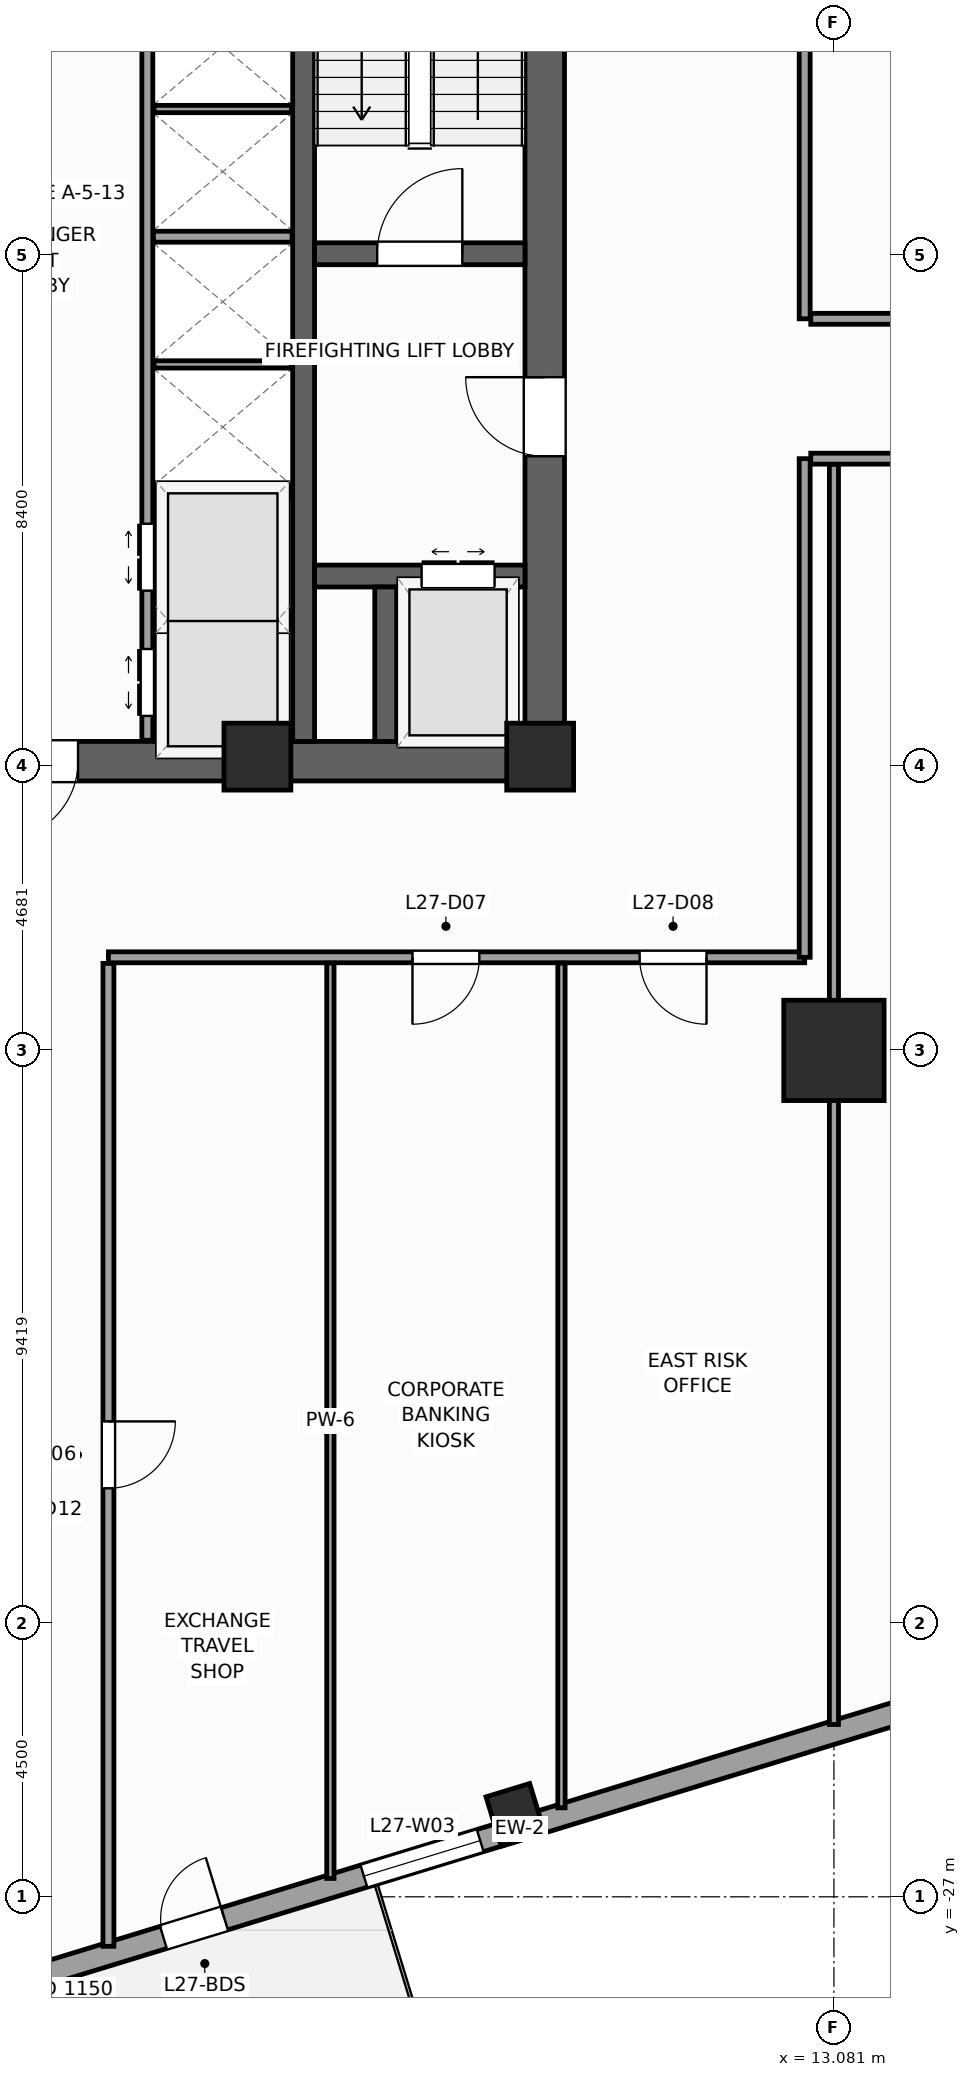
"""IFC4 building model, lengths in metres.
Left out: names, types, materials, properties, quantities, classifications, styles, units other than length and angle.
Written with IfcOpenShell. Run it as: python <this file> out.ifc"""

import sys

from ifc_helpers import new_model, si_unit, direction, frame, frame_2d, origin, origin_2d, place, context, subcontext, project, spatial, rectangle, extrude, source, transform, mapped, element, fill, save


model = new_model("IFC4")
c1 = context("Model", 3, precision=1e-05, world=origin(), true_north=direction((0.0, 1.0)))
c2 = subcontext(c1, "Body", "Model", "MODEL_VIEW")
j1 = project(units=[si_unit("LENGTHUNIT", "METRE"), si_unit("PLANEANGLEUNIT", "RADIAN")], contexts=[c1])
p1 = place(None, origin())
s1 = spatial("IfcSite", under=j1, at=p1, CompositionType="ELEMENT")
p2 = place(p1, origin())
s2 = spatial("IfcBuilding", under=s1, at=p2, CompositionType="ELEMENT")
p3 = place(p2, frame((0.0, 0.0, 115.2)))
s3 = spatial("IfcBuildingStorey", under=s2, at=p3, CompositionType="ELEMENT", Elevation=115.2)
p4 = place(p3, frame((-8.65, -8.325, 0.0), z_axis=(0.0, 0.0, 1.0), x_axis=(1.0, 0.0, 0.0)))
e1 = element("IfcWall", 1, at=p4, inside=s3, PredefinedType="SHEAR", context=c2, shape_type="SweptSolid", body=[
    extrude(rectangle(XDim=17.3, YDim=0.65, at=frame_2d((8.65, 0.0))), origin(), (0.0, 0.0, 1.0), 4.0),
])
p5 = place(p4, frame((8.0, 0.0, 0.0)))
e2 = element("IfcOpeningElement", 2, at=p5, cuts=e1, PredefinedType="OPENING", context=c2, shape_type="SweptSolid", body=[
    extrude(rectangle(XDim=1.3, YDim=2.2, at=frame_2d((0.65, 1.1))), frame((0.0, 0.335, 0.0), z_axis=(0.0, -1.0, 0.0), x_axis=(1.0, 0.0, 0.0)), (0.0, 0.0, 1.0), 0.67),
])
p6 = place(p3, frame((8.325, -8.0, 0.0), z_axis=(0.0, 0.0, 1.0), x_axis=(0.0, 1.0, 0.0)))
e3 = element("IfcWall", 3, at=p6, inside=s3, PredefinedType="SHEAR", context=c2, shape_type="SweptSolid", body=[
    extrude(rectangle(XDim=16.0, YDim=0.65, at=frame_2d((8.0, 0.0))), origin(), (0.0, 0.0, 1.0), 4.0),
])
p7 = place(p6, frame((4.69, 0.0, 0.0)))
e4 = element("IfcOpeningElement", 4, at=p7, cuts=e3, PredefinedType="OPENING", context=c2, shape_type="SweptSolid", body=[
    extrude(rectangle(XDim=1.3, YDim=2.2, at=frame_2d((0.65, 1.1))), frame((0.0, 0.335, 0.0), z_axis=(0.0, -1.0, 0.0), x_axis=(1.0, 0.0, 0.0)), (0.0, 0.0, 1.0), 0.67),
])
p8 = place(p3, frame((4.36, -8.0, 0.0), z_axis=(0.0, 0.0, 1.0), x_axis=(0.0, 1.0, 0.0)))
e5 = element("IfcWall", 5, at=p8, inside=s3, PredefinedType="SHEAR", context=c2, shape_type="SweptSolid", body=[
    extrude(rectangle(XDim=16.0, YDim=0.36, at=frame_2d((8.0, 0.0))), origin(), (0.0, 0.0, 1.0), 4.0),
])
p9 = place(p3, frame((4.54, 0.02, 0.0), z_axis=(0.0, 0.0, 1.0), x_axis=(1.0, 0.0, 0.0)))
e6 = element("IfcWall", 6, at=p9, inside=s3, PredefinedType="SHEAR", context=c2, shape_type="SweptSolid", body=[
    extrude(rectangle(XDim=3.46, YDim=0.36, at=frame_2d((1.73, 0.0))), origin(), (0.0, 0.0, 1.0), 4.0),
])
p10 = place(p9, frame((1.03, 0.0, 0.0)))
e7 = element("IfcOpeningElement", 7, at=p10, cuts=e6, PredefinedType="OPENING", context=c2, shape_type="SweptSolid", body=[
    extrude(rectangle(XDim=1.4, YDim=2.2, at=frame_2d((0.7, 1.1))), frame((0.0, 0.19, 0.0), z_axis=(0.0, -1.0, 0.0), x_axis=(1.0, 0.0, 0.0)), (0.0, 0.0, 1.0), 0.38),
])
p11 = place(p3, frame((4.54, -5.28, 0.0), z_axis=(0.0, 0.0, 1.0), x_axis=(1.0, 0.0, 0.0)))
e8 = element("IfcWall", 8, at=p11, inside=s3, PredefinedType="SHEAR", context=c2, shape_type="SweptSolid", body=[
    extrude(rectangle(XDim=3.46, YDim=0.36, at=frame_2d((1.73, 0.0))), origin(), (0.0, 0.0, 1.0), 4.0),
])
p12 = place(p11, frame((1.76, 0.0, 0.0)))
e9 = element("IfcOpeningElement", 9, at=p12, cuts=e8, PredefinedType="OPENING", context=c2, shape_type="SweptSolid", body=[
    extrude(rectangle(XDim=1.2, YDim=2.25, at=frame_2d((0.6, 1.125))), frame((0.0, 0.19, 0.0), z_axis=(0.0, -1.0, 0.0), x_axis=(1.0, 0.0, 0.0)), (0.0, 0.0, 1.0), 0.38),
])
p13 = place(p3, frame((5.71, -8.0, 0.0), z_axis=(0.0, 0.0, 1.0), x_axis=(0.0, 1.0, 0.0)))
e10 = element("IfcWall", 10, at=p13, inside=s3, PredefinedType="SHEAR", context=c2, shape_type="SweptSolid", body=[
    extrude(rectangle(XDim=2.54, YDim=0.36, at=frame_2d((1.27, 0.0))), origin(), (0.0, 0.0, 1.0), 4.0),
])
m1 = source(origin(), c2, "Body", "SweptSolid", [
    extrude(rectangle(XDim=1.1, YDim=1.1, at=origin_2d()), origin(), (0.0, 0.0, 1.0), 4.0),
])
for number, where, z_axis, x_axis in (
    (11, (8.25, -8.25, 0.0), (0.0, 0.0, 1.0), (1.0, 0.0, 0.0)),
    (12, (3.6, -8.25, 0.0), (0.0, 0.0, 1.0), (1.0, 0.0, 0.0)),
):
    element("IfcColumn", number, at=place(p3, frame(where, z_axis=z_axis, x_axis=x_axis)), inside=s3, PredefinedType="PILASTER", context=c2, shape_type="MappedRepresentation", body=[
        mapped(m1, transform((0.0, 0.0, 0.0), scale=1.0)),
    ])
m2 = source(origin(), c2, "Body", "SweptSolid", [
    extrude(rectangle(XDim=1.65, YDim=1.65, at=origin_2d()), origin(), (0.0, 0.0, 1.0), 4.0),
])
p14 = place(p3, frame((13.081, -13.081, 0.0), z_axis=(0.0, 0.0, 1.0), x_axis=(1.0, 0.0, 0.0)))
e13 = element("IfcColumn", 13, at=p14, inside=s3, PredefinedType="COLUMN", context=c2, shape_type="MappedRepresentation", body=[
    mapped(m2, transform((0.0, 0.0, 0.0), scale=1.0)),
])
m3 = source(origin(), c2, "Body", "SweptSolid", [
    extrude(rectangle(XDim=0.75, YDim=0.85, at=origin_2d()), origin(), (0.0, 0.0, 1.0), 4.0),
])
p15 = place(p3, frame((7.843, -25.653, 0.0), z_axis=(0.0, 0.0, 1.0), x_axis=(0.956304755963, 0.292371704723, 0.0)))
e14 = element("IfcColumn", 14, at=p15, inside=s3, PredefinedType="COLUMN", context=c2, shape_type="MappedRepresentation", body=[
    mapped(m3, transform((0.0, 0.0, 0.0), scale=1.0)),
])
p16 = place(p3, frame((-14.265, -32.658, 0.0), z_axis=(0.0, 0.0, 1.0), x_axis=(0.956304320851, 0.292373127906, 0.0)))
e15 = element("IfcWall", 15, at=p16, inside=s3, PredefinedType="STANDARD", context=c2, shape_type="SweptSolid", body=[
    extrude(rectangle(XDim=46.38, YDim=0.38, at=frame_2d((23.19, 0.0))), origin(), (0.0, 0.0, 1.0), 3.14),
])
p17 = place(p16, frame((17.065, 0.0, 0.0)))
e16 = element("IfcOpeningElement", 16, at=p17, cuts=e15, PredefinedType="OPENING", context=c2, shape_type="SweptSolid", body=[
    extrude(rectangle(XDim=1.05, YDim=2.25, at=frame_2d((0.525, 1.125))), frame((0.0, 0.2, 0.0), z_axis=(0.0, -1.0, 0.0), x_axis=(1.0, 0.0, 0.0)), (0.0, 0.0, 1.0), 0.4),
])
p18 = place(p16, frame((4.865, 0.0, 0.51)))
e17 = element("IfcOpeningElement", 17, at=p18, cuts=e15, PredefinedType="OPENING", context=c2, shape_type="SweptSolid", body=[
    extrude(rectangle(XDim=1.4, YDim=2.4, at=frame_2d((0.7, 1.2))), frame((0.0, 0.2, 0.0), z_axis=(0.0, -1.0, 0.0), x_axis=(1.0, 0.0, 0.0)), (0.0, 0.0, 1.0), 0.4),
])
p19 = place(p16, frame((10.95, 0.0, 0.51)))
e18 = element("IfcOpeningElement", 18, at=p19, cuts=e15, PredefinedType="OPENING", context=c2, shape_type="SweptSolid", body=[
    extrude(rectangle(XDim=2.0, YDim=2.4, at=frame_2d((1.0, 1.2))), frame((0.0, 0.2, 0.0), z_axis=(0.0, -1.0, 0.0), x_axis=(1.0, 0.0, 0.0)), (0.0, 0.0, 1.0), 0.4),
])
p20 = place(p16, frame((20.512, 0.0, 0.51)))
e19 = element("IfcOpeningElement", 19, at=p20, cuts=e15, PredefinedType="OPENING", context=c2, shape_type="SweptSolid", body=[
    extrude(rectangle(XDim=2.0, YDim=2.4, at=frame_2d((1.0, 1.2))), frame((0.0, 0.2, 0.0), z_axis=(0.0, -1.0, 0.0), x_axis=(1.0, 0.0, 0.0)), (0.0, 0.0, 1.0), 0.4),
])
p21 = place(p16, frame((30.538, 0.0, 0.51)))
e20 = element("IfcOpeningElement", 20, at=p21, cuts=e15, PredefinedType="OPENING", context=c2, shape_type="SweptSolid", body=[
    extrude(rectangle(XDim=2.0, YDim=2.4, at=frame_2d((1.0, 1.2))), frame((0.0, 0.2, 0.0), z_axis=(0.0, -1.0, 0.0), x_axis=(1.0, 0.0, 0.0)), (0.0, 0.0, 1.0), 0.4),
])
p22 = place(p16, frame((39.187, 0.0, 0.51)))
e21 = element("IfcOpeningElement", 21, at=p22, cuts=e15, PredefinedType="OPENING", context=c2, shape_type="SweptSolid", body=[
    extrude(rectangle(XDim=1.4, YDim=2.4, at=frame_2d((0.7, 1.2))), frame((0.0, 0.2, 0.0), z_axis=(0.0, -1.0, 0.0), x_axis=(1.0, 0.0, 0.0)), (0.0, 0.0, 1.0), 0.4),
])
p23 = place(p3, frame((1.79, -7.98, 0.0), z_axis=(0.0, 0.0, 1.0), x_axis=(0.0, 1.0, 0.0)))
e22 = element("IfcWall", 22, at=p23, inside=s3, PredefinedType="PARTITIONING", context=c2, shape_type="SweptSolid", body=[
    extrude(rectangle(XDim=12.38, YDim=0.18, at=frame_2d((6.19, 0.0))), origin(), (0.0, 0.0, 1.0), 3.74),
])
p24 = place(p23, frame((0.4, 0.0, 0.0)))
e23 = element("IfcOpeningElement", 23, at=p24, cuts=e22, PredefinedType="OPENING", context=c2, shape_type="SweptSolid", body=[
    extrude(rectangle(XDim=1.1, YDim=2.2, at=frame_2d((0.55, 1.1))), frame((0.0, 0.1, 0.0), z_axis=(0.0, -1.0, 0.0), x_axis=(1.0, 0.0, 0.0)), (0.0, 0.0, 1.0), 0.2),
])
p25 = place(p23, frame((2.46, 0.0, 0.0)))
e24 = element("IfcOpeningElement", 24, at=p25, cuts=e22, PredefinedType="OPENING", context=c2, shape_type="SweptSolid", body=[
    extrude(rectangle(XDim=1.1, YDim=2.2, at=frame_2d((0.55, 1.1))), frame((0.0, 0.1, 0.0), z_axis=(0.0, -1.0, 0.0), x_axis=(1.0, 0.0, 0.0)), (0.0, 0.0, 1.0), 0.2),
])
for number, where, z_axis, x_axis in (
    (25, (1.89, -3.9, 0.0), (0.0, 0.0, 1.0), (1.0, 0.0, 0.0)),
    (26, (1.89, 0.3, 0.0), (0.0, 0.0, 1.0), (1.0, 0.0, 0.0)),
):
    element("IfcWall", number, at=place(p3, frame(where, z_axis=z_axis, x_axis=x_axis)), inside=s3, PredefinedType="PARTITIONING", context=c2, shape_type="SweptSolid", body=[
        extrude(rectangle(XDim=2.28, YDim=0.18, at=frame_2d((1.14, 0.0))), origin(), (0.0, 0.0, 1.0), 3.74),
    ])
for number, where, z_axis, x_axis in (
    (27, (1.9, -6.0, 0.0), (0.0, 0.0, 1.0), (1.0, 0.0, 0.0)),
    (28, (1.9, -1.8, 0.0), (0.0, 0.0, 1.0), (1.0, 0.0, 0.0)),
    (29, (1.9, 2.4, 0.0), (0.0, 0.0, 1.0), (1.0, 0.0, 0.0)),
):
    element("IfcWall", number, at=place(p3, frame(where, z_axis=z_axis, x_axis=x_axis)), inside=s3, PredefinedType="PARTITIONING", context=c2, shape_type="SweptSolid", body=[
        extrude(rectangle(XDim=2.26, YDim=0.12, at=frame_2d((1.13, 0.0))), origin(), (0.0, 0.0, 1.0), 3.74),
    ])
p26 = place(p3, frame((1.15, -11.55, 0.0), z_axis=(0.0, 0.0, 1.0), x_axis=(1.0, 0.0, 0.0)))
e30 = element("IfcWall", 30, at=p26, inside=s3, PredefinedType="PARTITIONING", context=c2, shape_type="SweptSolid", body=[
    extrude(rectangle(XDim=11.45, YDim=0.18, at=frame_2d((5.725, 0.0))), origin(), (0.0, 0.0, 1.0), 3.74),
])
p27 = place(p26, frame((5.0, 0.0, 0.0)))
e31 = element("IfcOpeningElement", 31, at=p27, cuts=e30, PredefinedType="OPENING", context=c2, shape_type="SweptSolid", body=[
    extrude(rectangle(XDim=1.1, YDim=2.2, at=frame_2d((0.55, 1.1))), frame((0.0, 0.1, 0.0), z_axis=(0.0, -1.0, 0.0), x_axis=(1.0, 0.0, 0.0)), (0.0, 0.0, 1.0), 0.2),
])
p28 = place(p26, frame((8.736, 0.0, 0.0)))
e32 = element("IfcOpeningElement", 32, at=p28, cuts=e30, PredefinedType="OPENING", context=c2, shape_type="SweptSolid", body=[
    extrude(rectangle(XDim=1.1, YDim=2.2, at=frame_2d((0.55, 1.1))), frame((0.0, 0.1, 0.0), z_axis=(0.0, -1.0, 0.0), x_axis=(1.0, 0.0, 0.0)), (0.0, 0.0, 1.0), 0.2),
])
p29 = place(p3, frame((12.6, -11.55, 0.0), z_axis=(0.0, 0.0, 1.0), x_axis=(0.0, 1.0, 0.0)))
e33 = element("IfcWall", 33, at=p29, inside=s3, PredefinedType="PARTITIONING", context=c2, shape_type="SweptSolid", body=[
    extrude(rectangle(XDim=8.2, YDim=0.18, at=frame_2d((4.1, 0.0))), origin(), (0.0, 0.0, 1.0), 3.74),
])
p30 = place(p3, frame((12.6, -1.05, 0.0), z_axis=(0.0, 0.0, 1.0), x_axis=(0.0, 1.0, 0.0)))
e34 = element("IfcWall", 34, at=p30, inside=s3, PredefinedType="PARTITIONING", context=c2, shape_type="SweptSolid", body=[
    extrude(rectangle(XDim=11.5, YDim=0.18, at=frame_2d((5.75, 0.0))), origin(), (0.0, 0.0, 1.0), 3.74),
])
p31 = place(p3, frame((12.7, -3.35, 0.0), z_axis=(0.0, 0.0, 1.0), x_axis=(1.0, 0.0, 0.0)))
e35 = element("IfcWall", 35, at=p31, inside=s3, PredefinedType="PARTITIONING", context=c2, shape_type="SweptSolid", body=[
    extrude(rectangle(XDim=16.49, YDim=0.18, at=frame_2d((8.245, 0.0))), origin(), (0.0, 0.0, 1.0), 3.74),
])
p32 = place(p31, frame((7.721, 0.0, 0.0)))
e36 = element("IfcOpeningElement", 36, at=p32, cuts=e35, PredefinedType="OPENING", context=c2, shape_type="SweptSolid", body=[
    extrude(rectangle(XDim=1.1, YDim=2.2, at=frame_2d((0.55, 1.1))), frame((0.0, 0.1, 0.0), z_axis=(0.0, -1.0, 0.0), x_axis=(1.0, 0.0, 0.0)), (0.0, 0.0, 1.0), 0.2),
])
p33 = place(p3, frame((12.7, -1.05, 0.0), z_axis=(0.0, 0.0, 1.0), x_axis=(1.0, 0.0, 0.0)))
e37 = element("IfcWall", 37, at=p33, inside=s3, PredefinedType="PARTITIONING", context=c2, shape_type="SweptSolid", body=[
    extrude(rectangle(XDim=15.787, YDim=0.18, at=frame_2d((7.894, 0.0))), origin(), (0.0, 0.0, 1.0), 3.74),
])
p34 = place(p33, frame((7.343, 0.0, 0.0)))
e38 = element("IfcOpeningElement", 38, at=p34, cuts=e37, PredefinedType="OPENING", context=c2, shape_type="SweptSolid", body=[
    extrude(rectangle(XDim=1.1, YDim=2.2, at=frame_2d((0.55, 1.1))), frame((0.0, 0.1, 0.0), z_axis=(0.0, -1.0, 0.0), x_axis=(1.0, 0.0, 0.0)), (0.0, 0.0, 1.0), 0.2),
])
p35 = place(p3, frame((1.15, -27.814, 0.0), z_axis=(0.0, 0.0, 1.0), x_axis=(0.0, 1.0, 0.0)))
e39 = element("IfcWall", 39, at=p35, inside=s3, PredefinedType="PARTITIONING", context=c2, shape_type="SweptSolid", body=[
    extrude(rectangle(XDim=16.164, YDim=0.18, at=frame_2d((8.082, 0.0))), origin(), (0.0, 0.0, 1.0), 3.74),
])
p36 = place(p35, frame((7.532, 0.0, 0.0)))
e40 = element("IfcOpeningElement", 40, at=p36, cuts=e39, PredefinedType="OPENING", context=c2, shape_type="SweptSolid", body=[
    extrude(rectangle(XDim=1.1, YDim=2.2, at=frame_2d((0.55, 1.1))), frame((0.0, 0.1, 0.0), z_axis=(0.0, -1.0, 0.0), x_axis=(1.0, 0.0, 0.0)), (0.0, 0.0, 1.0), 0.2),
])
p37 = place(p3, frame((4.8, -26.698, 0.0), z_axis=(0.0, 0.0, 1.0), x_axis=(0.0, 1.0, 0.0)))
e41 = element("IfcWall", 41, at=p37, inside=s3, PredefinedType="PARTITIONING", context=c2, shape_type="SweptSolid", body=[
    extrude(rectangle(XDim=15.053, YDim=0.12, at=frame_2d((7.527, 0.0))), origin(), (0.0, 0.0, 1.0), 3.74),
])
p38 = place(p3, frame((8.6, -25.536, 0.0), z_axis=(0.0, 0.0, 1.0), x_axis=(0.0, 1.0, 0.0)))
e42 = element("IfcWall", 42, at=p38, inside=s3, PredefinedType="PARTITIONING", context=c2, shape_type="SweptSolid", body=[
    extrude(rectangle(XDim=13.891, YDim=0.12, at=frame_2d((6.946, 0.0))), origin(), (0.0, 0.0, 1.0), 3.04),
])
p39 = place(p3, frame((13.081, -24.167, 0.0), z_axis=(0.0, 0.0, 1.0), x_axis=(0.0, 1.0, 0.0)))
e43 = element("IfcWall", 43, at=p39, inside=s3, PredefinedType="PARTITIONING", context=c2, shape_type="SweptSolid", body=[
    extrude(rectangle(XDim=20.721, YDim=0.15, at=frame_2d((10.361, 0.0))), origin(), (0.0, 0.0, 1.0), 2.732),
])
m4 = source(origin(), c2, "Body", "SweptSolid", [
    extrude(rectangle(XDim=1.05, YDim=2.25, at=frame_2d((0.525, 1.125))), frame((0.0, 0.025, 0.0), z_axis=(0.0, -1.0, 0.0), x_axis=(1.0, 0.0, 0.0)), (0.0, 0.0, 1.0), 0.05),
])
p40 = place(p17, origin())
e44 = element("IfcDoor", 44, at=p40, inside=s3, OperationType="SINGLE_SWING_RIGHT", PredefinedType="DOOR", context=c2, shape_type="MappedRepresentation", body=[
    mapped(m4, transform((0.0, 0.0, 0.0), scale=1.0)),
])
fill(e16, e44)
m5 = source(origin(), c2, "Body", "SweptSolid", [
    extrude(rectangle(XDim=2.0, YDim=2.4, at=frame_2d((1.0, 1.2))), frame((0.0, 0.03, 0.0), z_axis=(0.0, -1.0, 0.0), x_axis=(1.0, 0.0, 0.0)), (0.0, 0.0, 1.0), 0.06),
])
p41 = place(p20, origin())
e45 = element("IfcWindow", 45, at=p41, inside=s3, PartitioningType="SINGLE_PANEL", PredefinedType="WINDOW", context=c2, shape_type="MappedRepresentation", body=[
    mapped(m5, transform((0.0, 0.0, 0.0), scale=1.0)),
])
fill(e19, e45)
m6 = source(origin(), c2, "Body", "SweptSolid", [
    extrude(rectangle(XDim=1.4, YDim=2.2, at=frame_2d((0.7, 1.1))), frame((0.0, 0.025, 0.0), z_axis=(0.0, -1.0, 0.0), x_axis=(1.0, 0.0, 0.0)), (0.0, 0.0, 1.0), 0.05),
])
p42 = place(p10, origin())
e46 = element("IfcDoor", 46, at=p42, inside=s3, OperationType="SINGLE_SWING_RIGHT", PredefinedType="DOOR", context=c2, shape_type="MappedRepresentation", body=[
    mapped(m6, transform((0.0, 0.0, 0.0), scale=1.0)),
])
fill(e7, e46)
m7 = source(origin(), c2, "Body", "SweptSolid", [
    extrude(rectangle(XDim=1.3, YDim=2.2, at=frame_2d((0.65, 1.1))), frame((0.0, 0.025, 0.0), z_axis=(0.0, -1.0, 0.0), x_axis=(1.0, 0.0, 0.0)), (0.0, 0.0, 1.0), 0.05),
])
p43 = place(p7, origin())
e47 = element("IfcDoor", 47, at=p43, inside=s3, OperationType="SINGLE_SWING_RIGHT", PredefinedType="DOOR", context=c2, shape_type="MappedRepresentation", body=[
    mapped(m7, transform((0.0, 0.0, 0.0), scale=1.0)),
])
fill(e4, e47)
p44 = place(p5, frame((1.3, 0.0, 0.0), z_axis=(0.0, 0.0, 1.0), x_axis=(-1.0, 0.0, 0.0)))
e48 = element("IfcDoor", 48, at=p44, inside=s3, OperationType="SINGLE_SWING_LEFT", PredefinedType="DOOR", context=c2, shape_type="MappedRepresentation", body=[
    mapped(m7, transform((0.0, 0.0, 0.0), scale=1.0)),
])
fill(e2, e48)
m8 = source(origin(), c2, "Body", "SweptSolid", [
    extrude(rectangle(XDim=1.2, YDim=2.25, at=frame_2d((0.6, 1.125))), frame((0.0, 0.025, 0.0), z_axis=(0.0, -1.0, 0.0), x_axis=(1.0, 0.0, 0.0)), (0.0, 0.0, 1.0), 0.05),
])
p45 = place(p12, origin())
e49 = element("IfcDoor", 49, at=p45, inside=s3, OperationType="DOUBLE_DOOR_SLIDING", PredefinedType="DOOR", context=c2, shape_type="MappedRepresentation", body=[
    mapped(m8, transform((0.0, 0.0, 0.0), scale=1.0)),
])
fill(e9, e49)
m9 = source(origin(), c2, "Body", "SweptSolid", [
    extrude(rectangle(XDim=1.1, YDim=2.2, at=frame_2d((0.55, 1.1))), frame((0.0, 0.025, 0.0), z_axis=(0.0, -1.0, 0.0), x_axis=(1.0, 0.0, 0.0)), (0.0, 0.0, 1.0), 0.05),
])
p46 = place(p24, origin())
e50 = element("IfcDoor", 50, at=p46, inside=s3, OperationType="DOUBLE_DOOR_SLIDING", PredefinedType="DOOR", context=c2, shape_type="MappedRepresentation", body=[
    mapped(m9, transform((0.0, 0.0, 0.0), scale=1.0)),
])
fill(e23, e50)
p47 = place(p25, origin())
e51 = element("IfcDoor", 51, at=p47, inside=s3, OperationType="DOUBLE_DOOR_SLIDING", PredefinedType="DOOR", context=c2, shape_type="MappedRepresentation", body=[
    mapped(m9, transform((0.0, 0.0, 0.0), scale=1.0)),
])
fill(e24, e51)
p48 = place(p36, frame((1.1, 0.0, 0.0), z_axis=(0.0, 0.0, 1.0), x_axis=(-1.0, 0.0, 0.0)))
e52 = element("IfcDoor", 52, at=p48, inside=s3, OperationType="SINGLE_SWING_RIGHT", PredefinedType="DOOR", context=c2, shape_type="MappedRepresentation", body=[
    mapped(m9, transform((0.0, 0.0, 0.0), scale=1.0)),
])
fill(e40, e52)
p49 = place(p27, frame((1.1, 0.0, 0.0), z_axis=(0.0, 0.0, 1.0), x_axis=(-1.0, 0.0, 0.0)))
e53 = element("IfcDoor", 53, at=p49, inside=s3, OperationType="SINGLE_SWING_LEFT", PredefinedType="DOOR", context=c2, shape_type="MappedRepresentation", body=[
    mapped(m9, transform((0.0, 0.0, 0.0), scale=1.0)),
])
fill(e31, e53)
p50 = place(p28, frame((1.1, 0.0, 0.0), z_axis=(0.0, 0.0, 1.0), x_axis=(-1.0, 0.0, 0.0)))
e54 = element("IfcDoor", 54, at=p50, inside=s3, OperationType="SINGLE_SWING_RIGHT", PredefinedType="DOOR", context=c2, shape_type="MappedRepresentation", body=[
    mapped(m9, transform((0.0, 0.0, 0.0), scale=1.0)),
])
fill(e32, e54)
save(model, sys.argv[1])
